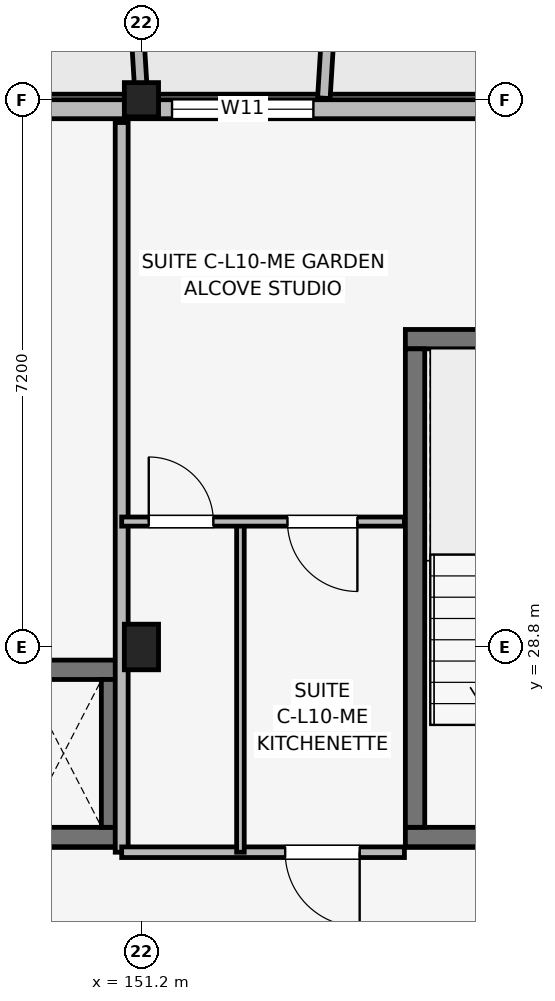
"""IFC4 building model, lengths in metres.
Left out: names, types, materials, properties, quantities, classifications, styles, units other than length and angle.
Written with IfcOpenShell. Run it as: python <this file> out.ifc"""

import sys

from ifc_helpers import new_model, si_unit, direction, frame, frame_2d, origin, origin_2d, place, context, subcontext, project, spatial, rectangle, extrude, element, fill, save


model = new_model("IFC4")
c1 = context("Model", 3, precision=1e-05, world=origin(), true_north=direction((0.0, 1.0)))
c2 = subcontext(c1, "Body", "Model", "MODEL_VIEW")
j1 = project(units=[si_unit("LENGTHUNIT", "METRE"), si_unit("PLANEANGLEUNIT", "RADIAN")], contexts=[c1])
p1 = place(None, origin())
s1 = spatial("IfcSite", under=j1, at=p1, CompositionType="ELEMENT")
p2 = place(p1, origin())
s2 = spatial("IfcBuilding", under=s1, at=p2, CompositionType="ELEMENT")
p3 = place(p2, frame((0.0, 0.0, 33.9)))
s3 = spatial("IfcBuildingStorey", under=s2, at=p3, CompositionType="ELEMENT", Elevation=33.9)
p4 = place(p3, frame((151.2, 28.8, 0.0), z_axis=(0.0, 0.0, 1.0), x_axis=(1.0, 0.0, 0.0)))
e1 = element("IfcColumn", 1, at=p4, inside=s3, PredefinedType="COLUMN", context=c2, shape_type="SweptSolid", body=[
    extrude(rectangle(XDim=0.45, YDim=0.6, at=origin_2d()), origin(), (0.0, 0.0, 1.0), 3.15),
])
p5 = place(p3, frame((151.2, 36.0, 0.0), z_axis=(0.0, 0.0, 1.0), x_axis=(1.0, 0.0, 0.0)))
e2 = element("IfcColumn", 2, at=p5, inside=s3, PredefinedType="COLUMN", context=c2, shape_type="SweptSolid", body=[
    extrude(rectangle(XDim=0.45, YDim=0.45, at=origin_2d()), origin(), (0.0, 0.0, 1.0), 3.15),
])
p6 = place(p3, frame((154.673, 26.3, 0.0), z_axis=(0.0, 0.0, 1.0), x_axis=(1.0, 0.0, 0.0)))
e3 = element("IfcWall", 3, at=p6, inside=s3, PredefinedType="SHEAR", context=c2, shape_type="SweptSolid", body=[
    extrude(rectangle(XDim=3.305, YDim=0.255, at=frame_2d((1.652, 0.0))), origin(), (0.0, 0.0, 1.0), 3.15),
])
p7 = place(p6, frame((1.127, 0.0, 0.0)))
e4 = element("IfcOpeningElement", 4, at=p7, cuts=e3, PredefinedType="OPENING", context=c2, shape_type="SweptSolid", body=[
    extrude(rectangle(XDim=1.05, YDim=2.12, at=frame_2d((0.525, 1.06))), frame((0.0, 0.137, 0.0), z_axis=(0.0, -1.0, 0.0), x_axis=(1.0, 0.0, 0.0)), (0.0, 0.0, 1.0), 0.275),
])
p8 = place(p3, frame((154.673, 32.85, 0.0), z_axis=(0.0, 0.0, 1.0), x_axis=(1.0, 0.0, 0.0)))
e5 = element("IfcWall", 5, at=p8, inside=s3, PredefinedType="SHEAR", context=c2, shape_type="SweptSolid", body=[
    extrude(rectangle(XDim=3.305, YDim=0.255, at=frame_2d((1.652, 0.0))), origin(), (0.0, 0.0, 1.0), 3.15),
])
p9 = place(p3, frame((154.8, 26.427, 0.0), z_axis=(0.0, 0.0, 1.0), x_axis=(0.0, 1.0, 0.0)))
e6 = element("IfcWall", 6, at=p9, inside=s3, PredefinedType="SHEAR", context=c2, shape_type="SweptSolid", body=[
    extrude(rectangle(XDim=6.295, YDim=0.255, at=frame_2d((3.147, 0.0))), origin(), (0.0, 0.0, 1.0), 3.15),
])
for number, where, z_axis, x_axis in (
    (7, (149.123, 26.3, 0.0), (0.0, 0.0, 1.0), (1.0, 0.0, 0.0)),
    (8, (149.123, 28.5, 0.0), (0.0, 0.0, 1.0), (1.0, 0.0, 0.0)),
):
    element("IfcWall", number, at=place(p3, frame(where, z_axis=z_axis, x_axis=x_axis)), inside=s3, PredefinedType="SHEAR", context=c2, shape_type="SweptSolid", body=[
        extrude(rectangle(XDim=1.805, YDim=0.255, at=frame_2d((0.902, 0.0))), origin(), (0.0, 0.0, 1.0), 3.15),
    ])
p10 = place(p3, frame((150.8, 26.427, 0.0), z_axis=(0.0, 0.0, 1.0), x_axis=(0.0, 1.0, 0.0)))
e9 = element("IfcWall", 9, at=p10, inside=s3, PredefinedType="SHEAR", context=c2, shape_type="SweptSolid", body=[
    extrude(rectangle(XDim=1.945, YDim=0.255, at=frame_2d((0.973, 0.0))), origin(), (0.0, 0.0, 1.0), 3.15),
])
p11 = place(p3, frame((162.6, 35.875, 0.0), z_axis=(0.0, 0.0, 1.0), x_axis=(-1.0, 0.0, 0.0)))
e10 = element("IfcWall", 10, at=p11, inside=s3, PredefinedType="SOLIDWALL", context=c2, shape_type="SweptSolid", body=[
    extrude(rectangle(XDim=30.0, YDim=0.25, at=frame_2d((15.0, 0.0))), origin(), (0.0, 0.0, 1.0), 2.45),
])
p12 = place(p11, frame((27.95, 0.0, 0.0), z_axis=(0.0, 0.0, 1.0), x_axis=(-1.0, 0.0, 0.0)))
e11 = element("IfcOpeningElement", 11, at=p12, cuts=e10, PredefinedType="OPENING", context=c2, shape_type="SweptSolid", body=[
    extrude(rectangle(XDim=1.5, YDim=2.15, at=frame_2d((0.75, 1.075))), frame((0.0, 0.135, 0.0), z_axis=(0.0, -1.0, 0.0), x_axis=(1.0, 0.0, 0.0)), (0.0, 0.0, 1.0), 0.27),
])
p13 = place(p11, frame((3.55, 0.0, 0.0), z_axis=(0.0, 0.0, 1.0), x_axis=(-1.0, 0.0, 0.0)))
e12 = element("IfcOpeningElement", 12, at=p13, cuts=e10, PredefinedType="OPENING", context=c2, shape_type="SweptSolid", body=[
    extrude(rectangle(XDim=1.5, YDim=2.15, at=frame_2d((0.75, 1.075))), frame((0.0, 0.135, 0.0), z_axis=(0.0, -1.0, 0.0), x_axis=(1.0, 0.0, 0.0)), (0.0, 0.0, 1.0), 0.27),
])
p14 = place(p11, frame((14.55, 0.0, 0.5)))
e13 = element("IfcOpeningElement", 13, at=p14, cuts=e10, PredefinedType="OPENING", context=c2, shape_type="SweptSolid", body=[
    extrude(rectangle(XDim=0.9, YDim=1.8, at=frame_2d((0.45, 0.9))), frame((0.0, 0.135, 0.0), z_axis=(0.0, -1.0, 0.0), x_axis=(1.0, 0.0, 0.0)), (0.0, 0.0, 1.0), 0.27),
])
p15 = place(p11, frame((9.137, 0.0, 0.7)))
e14 = element("IfcOpeningElement", 14, at=p15, cuts=e10, PredefinedType="OPENING", context=c2, shape_type="SweptSolid", body=[
    extrude(rectangle(XDim=1.86, YDim=1.6, at=frame_2d((0.93, 0.8))), frame((0.0, 0.135, 0.0), z_axis=(0.0, -1.0, 0.0), x_axis=(1.0, 0.0, 0.0)), (0.0, 0.0, 1.0), 0.27),
])
p16 = place(p11, frame((19.002, 0.0, 0.7)))
e15 = element("IfcOpeningElement", 15, at=p16, cuts=e10, PredefinedType="OPENING", context=c2, shape_type="SweptSolid", body=[
    extrude(rectangle(XDim=1.86, YDim=1.6, at=frame_2d((0.93, 0.8))), frame((0.0, 0.135, 0.0), z_axis=(0.0, -1.0, 0.0), x_axis=(1.0, 0.0, 0.0)), (0.0, 0.0, 1.0), 0.27),
])
p17 = place(p3, frame((151.2, 36.02, 0.0), z_axis=(0.0, 0.0, 1.0), x_axis=(-0.061046865508, 0.998134900808, 0.0)))
e16 = element("IfcWall", 16, at=p17, inside=s3, PredefinedType="ELEMENTEDWALL", context=c2, shape_type="SweptSolid", body=[
    extrude(rectangle(XDim=1.964, YDim=0.165, at=frame_2d((0.982, 0.0))), origin(), (0.0, 0.0, 1.0), 2.58),
])
p18 = place(p3, frame((153.6, 36.02, 0.0), z_axis=(0.0, 0.0, 1.0), x_axis=(0.061046865508, 0.998134900808, 0.0)))
e17 = element("IfcWall", 17, at=p18, inside=s3, PredefinedType="ELEMENTEDWALL", context=c2, shape_type="SweptSolid", body=[
    extrude(rectangle(XDim=1.964, YDim=0.165, at=frame_2d((0.982, 0.0))), origin(), (0.0, 0.0, 1.0), 2.45),
])
p19 = place(p3, frame((150.94, 26.1, 0.0), z_axis=(0.0, 0.0, 1.0), x_axis=(0.0, 1.0, 0.0)))
e18 = element("IfcWall", 18, at=p19, inside=s3, PredefinedType="PARTITIONING", context=c2, shape_type="SweptSolid", body=[
    extrude(rectangle(XDim=9.6, YDim=0.17, at=frame_2d((4.8, 0.0))), origin(), (0.0, 0.0, 1.0), 2.38),
])
p20 = place(p3, frame((150.94, 26.1, 0.0), z_axis=(0.0, 0.0, 1.0), x_axis=(1.0, 0.0, 0.0)))
e19 = element("IfcWall", 19, at=p20, inside=s3, PredefinedType="PARTITIONING", context=c2, shape_type="SweptSolid", body=[
    extrude(rectangle(XDim=3.72, YDim=0.14, at=frame_2d((1.86, 0.0))), origin(), (0.0, 0.0, 1.0), 2.38),
])
p21 = place(p20, frame((3.131, 0.0, 0.0), z_axis=(0.0, 0.0, 1.0), x_axis=(-1.0, 0.0, 0.0)))
e20 = element("IfcOpeningElement", 20, at=p21, cuts=e19, PredefinedType="OPENING", context=c2, shape_type="SweptSolid", body=[
    extrude(rectangle(XDim=0.98, YDim=2.1, at=frame_2d((0.49, 1.05))), frame((0.0, 0.08, 0.0), z_axis=(0.0, -1.0, 0.0), x_axis=(1.0, 0.0, 0.0)), (0.0, 0.0, 1.0), 0.16),
])
p22 = place(p3, frame((152.502, 26.1, 0.0), z_axis=(0.0, 0.0, 1.0), x_axis=(0.0, 1.0, 0.0)))
e21 = element("IfcWall", 21, at=p22, inside=s3, PredefinedType="PARTITIONING", context=c2, shape_type="SweptSolid", body=[
    extrude(rectangle(XDim=4.35, YDim=0.1, at=frame_2d((2.175, 0.0))), origin(), (0.0, 0.0, 1.0), 2.38),
])
p23 = place(p3, frame((150.94, 30.45, 0.0), z_axis=(0.0, 0.0, 1.0), x_axis=(1.0, 0.0, 0.0)))
e22 = element("IfcWall", 22, at=p23, inside=s3, PredefinedType="PARTITIONING", context=c2, shape_type="SweptSolid", body=[
    extrude(rectangle(XDim=3.72, YDim=0.12, at=frame_2d((1.86, 0.0))), origin(), (0.0, 0.0, 1.0), 2.38),
])
p24 = place(p23, frame((0.356, 0.0, 0.0)))
e23 = element("IfcOpeningElement", 23, at=p24, cuts=e22, PredefinedType="OPENING", context=c2, shape_type="SweptSolid", body=[
    extrude(rectangle(XDim=0.85, YDim=2.08, at=frame_2d((0.425, 1.04))), frame((0.0, 0.07, 0.0), z_axis=(0.0, -1.0, 0.0), x_axis=(1.0, 0.0, 0.0)), (0.0, 0.0, 1.0), 0.14),
])
p25 = place(p23, frame((3.101, 0.0, 0.0), z_axis=(0.0, 0.0, 1.0), x_axis=(-1.0, 0.0, 0.0)))
e24 = element("IfcOpeningElement", 24, at=p25, cuts=e22, PredefinedType="OPENING", context=c2, shape_type="SweptSolid", body=[
    extrude(rectangle(XDim=0.92, YDim=2.08, at=frame_2d((0.46, 1.04))), frame((0.0, 0.07, 0.0), z_axis=(0.0, -1.0, 0.0), x_axis=(1.0, 0.0, 0.0)), (0.0, 0.0, 1.0), 0.14),
])
p26 = place(p15, origin())
e25 = element("IfcWindow", 25, at=p26, inside=s3, PartitioningType="SINGLE_PANEL", PredefinedType="WINDOW", context=c2, shape_type="SweptSolid", body=[
    extrude(rectangle(XDim=1.86, YDim=1.6, at=frame_2d((0.93, 0.8))), frame((0.0, 0.03, 0.0), z_axis=(0.0, -1.0, 0.0), x_axis=(1.0, 0.0, 0.0)), (0.0, 0.0, 1.0), 0.06),
])
fill(e14, e25)
p27 = place(p21, origin())
e26 = element("IfcDoor", 26, at=p27, inside=s3, OperationType="SINGLE_SWING_RIGHT", PredefinedType="DOOR", context=c2, shape_type="SweptSolid", body=[
    extrude(rectangle(XDim=0.98, YDim=2.1, at=frame_2d((0.49, 1.05))), frame((0.0, 0.025, 0.0), z_axis=(0.0, -1.0, 0.0), x_axis=(1.0, 0.0, 0.0)), (0.0, 0.0, 1.0), 0.05),
])
fill(e20, e26)
p28 = place(p24, origin())
e27 = element("IfcDoor", 27, at=p28, inside=s3, OperationType="SINGLE_SWING_LEFT", PredefinedType="DOOR", context=c2, shape_type="SweptSolid", body=[
    extrude(rectangle(XDim=0.85, YDim=2.08, at=frame_2d((0.425, 1.04))), frame((0.0, 0.025, 0.0), z_axis=(0.0, -1.0, 0.0), x_axis=(1.0, 0.0, 0.0)), (0.0, 0.0, 1.0), 0.05),
])
fill(e23, e27)
p29 = place(p25, origin())
e28 = element("IfcDoor", 28, at=p29, inside=s3, OperationType="SINGLE_SWING_RIGHT", PredefinedType="DOOR", context=c2, shape_type="SweptSolid", body=[
    extrude(rectangle(XDim=0.92, YDim=2.08, at=frame_2d((0.46, 1.04))), frame((0.0, 0.025, 0.0), z_axis=(0.0, -1.0, 0.0), x_axis=(1.0, 0.0, 0.0)), (0.0, 0.0, 1.0), 0.05),
])
fill(e24, e28)
save(model, sys.argv[1])
